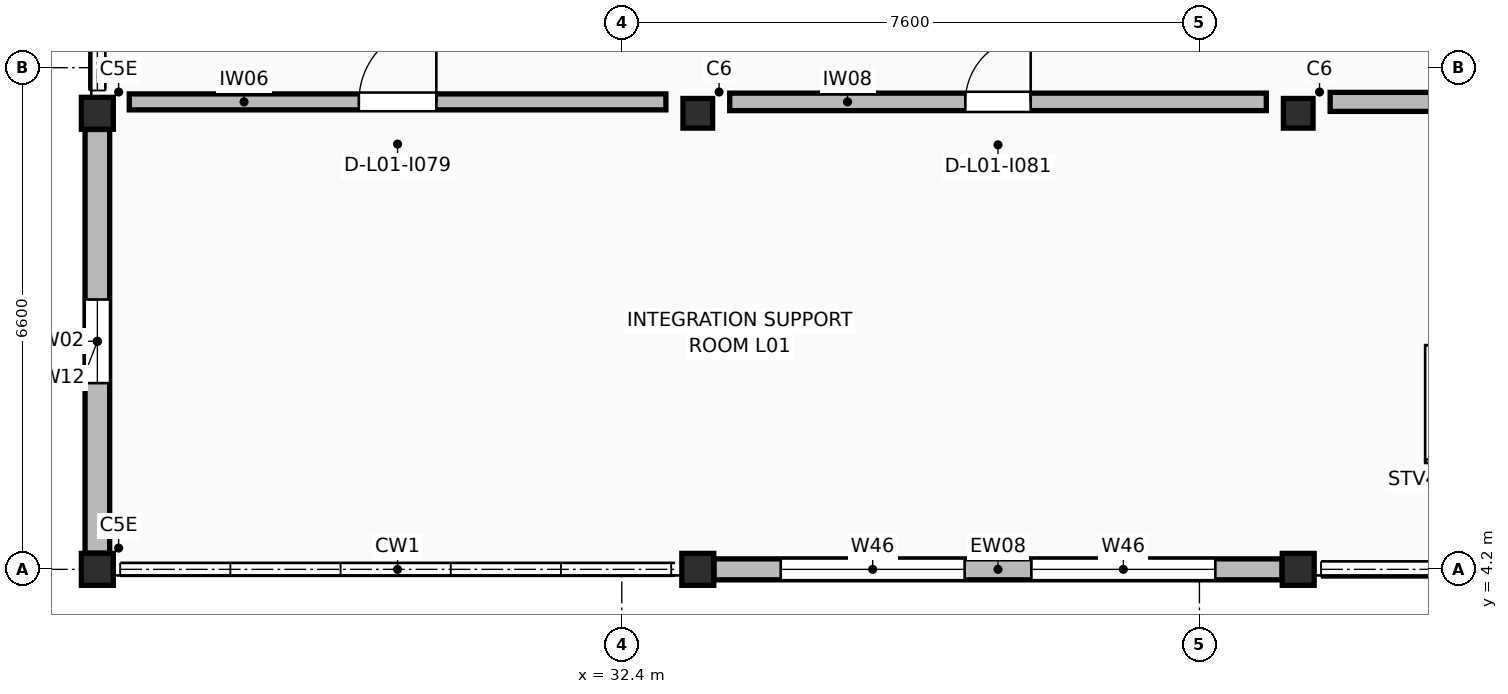
"""IFC4 building model, lengths in metres.
Left out: names, types, materials, properties, quantities, classifications, styles, units other than length and angle.
Written with IfcOpenShell. Run it as: python <this file> out.ifc"""

import sys

from ifc_helpers import new_model, si_unit, direction, frame, frame_2d, origin, origin_2d, place, context, subcontext, project, spatial, rectangle, extrude, element, fill, save


model = new_model("IFC4")
c1 = context("Model", 3, precision=1e-05, world=origin(), true_north=direction((0.0, 1.0)))
c2 = subcontext(c1, "Body", "Model", "MODEL_VIEW")
j1 = project(units=[si_unit("LENGTHUNIT", "METRE"), si_unit("PLANEANGLEUNIT", "RADIAN")], contexts=[c1])
p1 = place(None, origin())
s1 = spatial("IfcSite", under=j1, at=p1, CompositionType="ELEMENT")
p2 = place(p1, origin())
s2 = spatial("IfcBuilding", under=s1, at=p2, CompositionType="ELEMENT")
p3 = place(p2, frame((0.0, 0.0, 4.42)))
s3 = spatial("IfcBuildingStorey", under=s2, at=p3, CompositionType="ELEMENT", Elevation=4.42)
for number, where, z_axis, x_axis in (
    (1, (25.5, 4.2, 0.0), (0.0, 0.0, 1.0), (1.0, 0.0, 0.0)),
    (2, (25.5, 10.2, 0.0), (0.0, 0.0, 1.0), (1.0, 0.0, 0.0)),
    (3, (33.4, 4.2, 0.0), (0.0, 0.0, 1.0), (1.0, 0.0, 0.0)),
):
    element("IfcColumn", number, at=place(p3, frame(where, z_axis=z_axis, x_axis=x_axis)), inside=s3, PredefinedType="COLUMN", context=c2, shape_type="SweptSolid", body=[
        extrude(rectangle(XDim=0.42, YDim=0.42, at=origin_2d()), origin(), (0.0, 0.0, 1.0), 3.74),
    ])
p4 = place(p3, frame((33.4, 10.2, 0.0), z_axis=(0.0, 0.0, 1.0), x_axis=(1.0, 0.0, 0.0)))
e4 = element("IfcColumn", 4, at=p4, inside=s3, PredefinedType="COLUMN", context=c2, shape_type="SweptSolid", body=[
    extrude(rectangle(XDim=0.39, YDim=0.39, at=origin_2d()), origin(), (0.0, 0.0, 1.0), 3.74),
])
p5 = place(p3, frame((41.3, 4.2, 0.0), z_axis=(0.0, 0.0, 1.0), x_axis=(1.0, 0.0, 0.0)))
e5 = element("IfcColumn", 5, at=p5, inside=s3, PredefinedType="COLUMN", context=c2, shape_type="SweptSolid", body=[
    extrude(rectangle(XDim=0.42, YDim=0.42, at=origin_2d()), origin(), (0.0, 0.0, 1.0), 3.74),
])
p6 = place(p3, frame((41.3, 10.2, 0.0), z_axis=(0.0, 0.0, 1.0), x_axis=(1.0, 0.0, 0.0)))
e6 = element("IfcColumn", 6, at=p6, inside=s3, PredefinedType="COLUMN", context=c2, shape_type="SweptSolid", body=[
    extrude(rectangle(XDim=0.39, YDim=0.39, at=origin_2d()), origin(), (0.0, 0.0, 1.0), 3.74),
])
p7 = place(p3, frame((33.613, 4.2, 0.0), z_axis=(0.0, 0.0, 1.0), x_axis=(1.0, 0.0, 0.0)))
e7 = element("IfcWall", 7, at=p7, inside=s3, PredefinedType="STANDARD", context=c2, shape_type="SweptSolid", body=[
    extrude(rectangle(XDim=7.474, YDim=0.276, at=frame_2d((3.737, 0.0))), origin(), (0.0, 0.0, 1.0), 2.78),
])
p8 = place(p7, frame((0.878, 0.0, 0.95)))
e8 = element("IfcOpeningElement", 8, at=p8, cuts=e7, PredefinedType="OPENING", context=c2, shape_type="SweptSolid", body=[
    extrude(rectangle(XDim=2.42, YDim=1.3, at=frame_2d((1.21, 0.65))), frame((0.0, 0.148, 0.0), z_axis=(0.0, -1.0, 0.0), x_axis=(1.0, 0.0, 0.0)), (0.0, 0.0, 1.0), 0.296),
])
p9 = place(p7, frame((4.176, 0.0, 0.95)))
e9 = element("IfcOpeningElement", 9, at=p9, cuts=e7, PredefinedType="OPENING", context=c2, shape_type="SweptSolid", body=[
    extrude(rectangle(XDim=2.42, YDim=1.3, at=frame_2d((1.21, 0.65))), frame((0.0, 0.148, 0.0), z_axis=(0.0, -1.0, 0.0), x_axis=(1.0, 0.0, 0.0)), (0.0, 0.0, 1.0), 0.296),
])
p10 = place(p3, frame((25.5, 4.413, 0.0), z_axis=(0.0, 0.0, 1.0), x_axis=(0.0, 1.0, 0.0)))
e10 = element("IfcWall", 10, at=p10, inside=s3, PredefinedType="STANDARD", context=c2, shape_type="SweptSolid", body=[
    extrude(rectangle(XDim=5.574, YDim=0.324, at=frame_2d((2.787, 0.0))), origin(), (0.0, 0.0, 1.0), 2.78),
])
p11 = place(p10, frame((2.237, 0.0, 0.95)))
e11 = element("IfcOpeningElement", 11, at=p11, cuts=e10, PredefinedType="OPENING", context=c2, shape_type="SweptSolid", body=[
    extrude(rectangle(XDim=1.1, YDim=1.3, at=frame_2d((0.55, 0.65))), frame((0.0, 0.172, 0.0), z_axis=(0.0, -1.0, 0.0), x_axis=(1.0, 0.0, 0.0)), (0.0, 0.0, 1.0), 0.344),
])
p12 = place(p3, frame((25.92, 10.35, 0.0), z_axis=(0.0, 0.0, 1.0), x_axis=(1.0, 0.0, 0.0)))
e12 = element("IfcWall", 12, at=p12, inside=s3, PredefinedType="STANDARD", context=c2, shape_type="SweptSolid", body=[
    extrude(rectangle(XDim=7.06, YDim=0.21, at=frame_2d((3.53, 0.0))), origin(), (0.0, 0.0, 1.0), 2.75),
])
p13 = place(p12, frame((3.02, 0.0, 0.0)))
e13 = element("IfcOpeningElement", 13, at=p13, cuts=e12, PredefinedType="OPENING", context=c2, shape_type="SweptSolid", body=[
    extrude(rectangle(XDim=1.02, YDim=2.24, at=frame_2d((0.51, 1.12))), frame((0.0, 0.115, 0.0), z_axis=(0.0, -1.0, 0.0), x_axis=(1.0, 0.0, 0.0)), (0.0, 0.0, 1.0), 0.23),
])
p14 = place(p3, frame((33.82, 10.35, 0.0), z_axis=(0.0, 0.0, 1.0), x_axis=(1.0, 0.0, 0.0)))
e14 = element("IfcWall", 14, at=p14, inside=s3, PredefinedType="STANDARD", context=c2, shape_type="SweptSolid", body=[
    extrude(rectangle(XDim=7.06, YDim=0.23, at=frame_2d((3.53, 0.0))), origin(), (0.0, 0.0, 1.0), 2.75),
])
p15 = place(p14, frame((3.1, 0.0, 0.0)))
e15 = element("IfcOpeningElement", 15, at=p15, cuts=e14, PredefinedType="OPENING", context=c2, shape_type="SweptSolid", body=[
    extrude(rectangle(XDim=0.86, YDim=2.12, at=frame_2d((0.43, 1.06))), frame((0.0, 0.125, 0.0), z_axis=(0.0, -1.0, 0.0), x_axis=(1.0, 0.0, 0.0)), (0.0, 0.0, 1.0), 0.25),
])
p16 = place(p3, frame((41.72, 10.35, 0.0), z_axis=(0.0, 0.0, 1.0), x_axis=(1.0, 0.0, 0.0)))
e16 = element("IfcWall", 16, at=p16, inside=s3, PredefinedType="STANDARD", context=c2, shape_type="SweptSolid", body=[
    extrude(rectangle(XDim=7.06, YDim=0.25, at=frame_2d((3.53, 0.0))), origin(), (0.0, 0.0, 1.0), 2.75),
])
p17 = place(p8, origin())
e17 = element("IfcWindow", 17, at=p17, inside=s3, PartitioningType="SINGLE_PANEL", PredefinedType="WINDOW", context=c2, shape_type="SweptSolid", body=[
    extrude(rectangle(XDim=2.42, YDim=1.3, at=frame_2d((1.21, 0.65))), frame((0.0, 0.03, 0.0), z_axis=(0.0, -1.0, 0.0), x_axis=(1.0, 0.0, 0.0)), (0.0, 0.0, 1.0), 0.06),
])
fill(e8, e17)
p18 = place(p9, origin())
e18 = element("IfcWindow", 18, at=p18, inside=s3, PartitioningType="SINGLE_PANEL", PredefinedType="WINDOW", context=c2, shape_type="SweptSolid", body=[
    extrude(rectangle(XDim=2.42, YDim=1.3, at=frame_2d((1.21, 0.65))), frame((0.0, 0.03, 0.0), z_axis=(0.0, -1.0, 0.0), x_axis=(1.0, 0.0, 0.0)), (0.0, 0.0, 1.0), 0.06),
])
fill(e9, e18)
p19 = place(p11, origin())
e19 = element("IfcWindow", 19, at=p19, inside=s3, PartitioningType="SINGLE_PANEL", PredefinedType="WINDOW", context=c2, shape_type="SweptSolid", body=[
    extrude(rectangle(XDim=1.1, YDim=1.3, at=frame_2d((0.55, 0.65))), frame((0.0, 0.03, 0.0), z_axis=(0.0, -1.0, 0.0), x_axis=(1.0, 0.0, 0.0)), (0.0, 0.0, 1.0), 0.06),
])
fill(e11, e19)
p20 = place(p13, origin())
e20 = element("IfcDoor", 20, at=p20, inside=s3, OperationType="SINGLE_SWING_RIGHT", PredefinedType="DOOR", context=c2, shape_type="SweptSolid", body=[
    extrude(rectangle(XDim=1.02, YDim=2.24, at=frame_2d((0.51, 1.12))), frame((0.0, 0.025, 0.0), z_axis=(0.0, -1.0, 0.0), x_axis=(1.0, 0.0, 0.0)), (0.0, 0.0, 1.0), 0.05),
])
fill(e13, e20)
p21 = place(p15, origin())
e21 = element("IfcDoor", 21, at=p21, inside=s3, OperationType="SINGLE_SWING_RIGHT", PredefinedType="DOOR", context=c2, shape_type="SweptSolid", body=[
    extrude(rectangle(XDim=0.86, YDim=2.12, at=frame_2d((0.43, 1.06))), frame((0.0, 0.025, 0.0), z_axis=(0.0, -1.0, 0.0), x_axis=(1.0, 0.0, 0.0)), (0.0, 0.0, 1.0), 0.05),
])
fill(e15, e21)
save(model, sys.argv[1])
